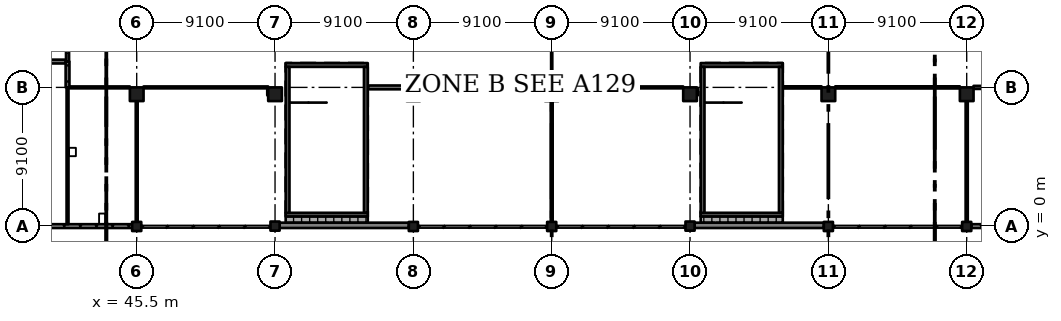
"""IFC4 building model, lengths in metres.
Left out: names, types, materials, properties, quantities, classifications, styles, units other than length and angle.
Written with IfcOpenShell. Run it as: python <this file> out.ifc"""

import sys

from ifc_helpers import new_model, si_unit, direction, frame, frame_2d, origin, origin_2d, place, context, subcontext, project, spatial, rectangle, extrude, element, fill, save


model = new_model("IFC4")
c1 = context("Model", 3, precision=1e-05, world=origin(), true_north=direction((0.0, 1.0)))
c2 = subcontext(c1, "Body", "Model", "MODEL_VIEW")
j1 = project(units=[si_unit("LENGTHUNIT", "METRE"), si_unit("PLANEANGLEUNIT", "RADIAN")], contexts=[c1])
p1 = place(None, origin())
s1 = spatial("IfcSite", under=j1, at=p1, CompositionType="ELEMENT")
p2 = place(p1, origin())
s2 = spatial("IfcBuilding", under=s1, at=p2, CompositionType="ELEMENT")
p3 = place(p2, frame((0.0, 0.0, 10.92)))
s3 = spatial("IfcBuildingStorey", under=s2, at=p3, CompositionType="ELEMENT", Elevation=10.92)
p4 = place(p3, frame((45.5, -0.05, 0.0), z_axis=(0.0, 0.0, 1.0), x_axis=(1.0, 0.0, 0.0)))
e1 = element("IfcColumn", 1, at=p4, inside=s3, PredefinedType="COLUMN", context=c2, shape_type="SweptSolid", body=[
    extrude(rectangle(XDim=0.6, YDim=0.6, at=origin_2d()), origin(), (0.0, 0.0, 1.0), 4.55),
])
p5 = place(p3, frame((45.5, 8.65, 0.0), z_axis=(0.0, 0.0, 1.0), x_axis=(1.0, 0.0, 0.0)))
e2 = element("IfcColumn", 2, at=p5, inside=s3, PredefinedType="COLUMN", context=c2, shape_type="SweptSolid", body=[
    extrude(rectangle(XDim=0.9, YDim=0.9, at=origin_2d()), origin(), (0.0, 0.0, 1.0), 4.55),
])
p6 = place(p3, frame((54.6, -0.025, 0.0), z_axis=(0.0, 0.0, 1.0), x_axis=(1.0, 0.0, 0.0)))
e3 = element("IfcColumn", 3, at=p6, inside=s3, PredefinedType="COLUMN", context=c2, shape_type="SweptSolid", body=[
    extrude(rectangle(XDim=0.6, YDim=0.6, at=origin_2d()), origin(), (0.0, 0.0, 1.0), 4.55),
])
p7 = place(p3, frame((54.6, 8.65, 0.0), z_axis=(0.0, 0.0, 1.0), x_axis=(1.0, 0.0, 0.0)))
e4 = element("IfcColumn", 4, at=p7, inside=s3, PredefinedType="COLUMN", context=c2, shape_type="SweptSolid", body=[
    extrude(rectangle(XDim=0.9, YDim=0.9, at=origin_2d()), origin(), (0.0, 0.0, 1.0), 4.55),
])
p8 = place(p3, frame((63.7, -0.05, 0.0), z_axis=(0.0, 0.0, 1.0), x_axis=(1.0, 0.0, 0.0)))
e5 = element("IfcColumn", 5, at=p8, inside=s3, PredefinedType="COLUMN", context=c2, shape_type="SweptSolid", body=[
    extrude(rectangle(XDim=0.6, YDim=0.6, at=origin_2d()), origin(), (0.0, 0.0, 1.0), 4.55),
])
p9 = place(p3, frame((63.7, 8.65, 0.0), z_axis=(0.0, 0.0, 1.0), x_axis=(1.0, 0.0, 0.0)))
e6 = element("IfcColumn", 6, at=p9, inside=s3, PredefinedType="COLUMN", context=c2, shape_type="SweptSolid", body=[
    extrude(rectangle(XDim=0.9, YDim=0.9, at=origin_2d()), origin(), (0.0, 0.0, 1.0), 4.55),
])
p10 = place(p3, frame((72.8, -0.05, 0.0), z_axis=(0.0, 0.0, 1.0), x_axis=(1.0, 0.0, 0.0)))
e7 = element("IfcColumn", 7, at=p10, inside=s3, PredefinedType="COLUMN", context=c2, shape_type="SweptSolid", body=[
    extrude(rectangle(XDim=0.6, YDim=0.6, at=origin_2d()), origin(), (0.0, 0.0, 1.0), 4.55),
])
p11 = place(p3, frame((72.8, 8.65, 0.0), z_axis=(0.0, 0.0, 1.0), x_axis=(1.0, 0.0, 0.0)))
e8 = element("IfcColumn", 8, at=p11, inside=s3, PredefinedType="COLUMN", context=c2, shape_type="SweptSolid", body=[
    extrude(rectangle(XDim=0.9, YDim=0.9, at=origin_2d()), origin(), (0.0, 0.0, 1.0), 4.55),
])
p12 = place(p3, frame((81.9, -0.025, 0.0), z_axis=(0.0, 0.0, 1.0), x_axis=(1.0, 0.0, 0.0)))
e9 = element("IfcColumn", 9, at=p12, inside=s3, PredefinedType="COLUMN", context=c2, shape_type="SweptSolid", body=[
    extrude(rectangle(XDim=0.6, YDim=0.6, at=origin_2d()), origin(), (0.0, 0.0, 1.0), 4.55),
])
p13 = place(p3, frame((81.9, 8.65, 0.0), z_axis=(0.0, 0.0, 1.0), x_axis=(1.0, 0.0, 0.0)))
e10 = element("IfcColumn", 10, at=p13, inside=s3, PredefinedType="COLUMN", context=c2, shape_type="SweptSolid", body=[
    extrude(rectangle(XDim=0.9, YDim=0.9, at=origin_2d()), origin(), (0.0, 0.0, 1.0), 4.55),
])
p14 = place(p3, frame((91.0, -0.05, 0.0), z_axis=(0.0, 0.0, 1.0), x_axis=(1.0, 0.0, 0.0)))
e11 = element("IfcColumn", 11, at=p14, inside=s3, PredefinedType="COLUMN", context=c2, shape_type="SweptSolid", body=[
    extrude(rectangle(XDim=0.6, YDim=0.6, at=origin_2d()), origin(), (0.0, 0.0, 1.0), 4.55),
])
p15 = place(p3, frame((91.0, 8.65, 0.0), z_axis=(0.0, 0.0, 1.0), x_axis=(1.0, 0.0, 0.0)))
e12 = element("IfcColumn", 12, at=p15, inside=s3, PredefinedType="COLUMN", context=c2, shape_type="SweptSolid", body=[
    extrude(rectangle(XDim=0.9, YDim=0.9, at=origin_2d()), origin(), (0.0, 0.0, 1.0), 4.55),
])
p16 = place(p3, frame((100.1, -0.05, 0.0), z_axis=(0.0, 0.0, 1.0), x_axis=(1.0, 0.0, 0.0)))
e13 = element("IfcColumn", 13, at=p16, inside=s3, PredefinedType="COLUMN", context=c2, shape_type="SweptSolid", body=[
    extrude(rectangle(XDim=0.6, YDim=0.6, at=origin_2d()), origin(), (0.0, 0.0, 1.0), 4.55),
])
p17 = place(p3, frame((100.1, 8.65, 0.0), z_axis=(0.0, 0.0, 1.0), x_axis=(1.0, 0.0, 0.0)))
e14 = element("IfcColumn", 14, at=p17, inside=s3, PredefinedType="COLUMN", context=c2, shape_type="SweptSolid", body=[
    extrude(rectangle(XDim=0.9, YDim=0.9, at=origin_2d()), origin(), (0.0, 0.0, 1.0), 4.55),
])
p18 = place(p3, frame((60.7, 0.725, 0.0), z_axis=(0.0, 0.0, 1.0), x_axis=(-1.0, 0.0, 0.0)))
e15 = element("IfcWall", 15, at=p18, inside=s3, PredefinedType="SHEAR", context=c2, shape_type="SweptSolid", body=[
    extrude(rectangle(XDim=5.4, YDim=0.25, at=frame_2d((2.7, 0.0))), origin(), (0.0, 0.0, 1.0), 4.55),
])
p19 = place(p3, frame((60.7, 10.575, 0.0), z_axis=(0.0, 0.0, 1.0), x_axis=(-1.0, 0.0, 0.0)))
e16 = element("IfcWall", 16, at=p19, inside=s3, PredefinedType="SHEAR", context=c2, shape_type="SweptSolid", body=[
    extrude(rectangle(XDim=5.4, YDim=0.25, at=frame_2d((2.7, 0.0))), origin(), (0.0, 0.0, 1.0), 4.55),
])
p20 = place(p19, frame((1.5, 0.0, 0.0)))
e17 = element("IfcOpeningElement", 17, at=p20, cuts=e16, PredefinedType="OPENING", context=c2, shape_type="SweptSolid", body=[
    extrude(rectangle(XDim=2.4, YDim=2.1, at=frame_2d((1.2, 1.05))), frame((0.0, 0.135, 0.0), z_axis=(0.0, -1.0, 0.0), x_axis=(1.0, 0.0, 0.0)), (0.0, 0.0, 1.0), 0.27),
])
for number, where, z_axis, x_axis in (
    (18, (55.425, 10.45, 0.0), (0.0, 0.0, 1.0), (0.0, -1.0, 0.0)),
    (19, (60.575, 10.45, 0.0), (0.0, 0.0, 1.0), (0.0, -1.0, 0.0)),
):
    element("IfcWall", number, at=place(p3, frame(where, z_axis=z_axis, x_axis=x_axis)), inside=s3, PredefinedType="SHEAR", context=c2, shape_type="SweptSolid", body=[
        extrude(rectangle(XDim=9.6, YDim=0.25, at=frame_2d((4.8, 0.0))), origin(), (0.0, 0.0, 1.0), 4.55),
    ])
p21 = place(p3, frame((88.0, 0.725, 0.0), z_axis=(0.0, 0.0, 1.0), x_axis=(-1.0, 0.0, 0.0)))
e20 = element("IfcWall", 20, at=p21, inside=s3, PredefinedType="SHEAR", context=c2, shape_type="SweptSolid", body=[
    extrude(rectangle(XDim=5.4, YDim=0.25, at=frame_2d((2.7, 0.0))), origin(), (0.0, 0.0, 1.0), 4.55),
])
p22 = place(p3, frame((88.0, 10.575, 0.0), z_axis=(0.0, 0.0, 1.0), x_axis=(-1.0, 0.0, 0.0)))
e21 = element("IfcWall", 21, at=p22, inside=s3, PredefinedType="SHEAR", context=c2, shape_type="SweptSolid", body=[
    extrude(rectangle(XDim=5.4, YDim=0.25, at=frame_2d((2.7, 0.0))), origin(), (0.0, 0.0, 1.0), 4.55),
])
p23 = place(p22, frame((1.5, 0.0, 0.0)))
e22 = element("IfcOpeningElement", 22, at=p23, cuts=e21, PredefinedType="OPENING", context=c2, shape_type="SweptSolid", body=[
    extrude(rectangle(XDim=2.4, YDim=2.1, at=frame_2d((1.2, 1.05))), frame((0.0, 0.135, 0.0), z_axis=(0.0, -1.0, 0.0), x_axis=(1.0, 0.0, 0.0)), (0.0, 0.0, 1.0), 0.27),
])
for number, where, z_axis, x_axis in (
    (23, (82.725, 10.45, 0.0), (0.0, 0.0, 1.0), (0.0, -1.0, 0.0)),
    (24, (87.875, 10.45, 0.0), (0.0, 0.0, 1.0), (0.0, -1.0, 0.0)),
):
    element("IfcWall", number, at=place(p3, frame(where, z_axis=z_axis, x_axis=x_axis)), inside=s3, PredefinedType="SHEAR", context=c2, shape_type="SweptSolid", body=[
        extrude(rectangle(XDim=9.6, YDim=0.25, at=frame_2d((4.8, 0.0))), origin(), (0.0, 0.0, 1.0), 4.55),
    ])
p24 = place(p3, frame((36.725, -0.025, 0.0), z_axis=(0.0, 0.0, 1.0), x_axis=(1.0, 0.0, 0.0)))
e25 = element("IfcWall", 25, at=p24, inside=s3, PredefinedType="SOLIDWALL", context=c2, shape_type="SweptSolid", body=[
    extrude(rectangle(XDim=8.475, YDim=0.25, at=frame_2d((4.237, 0.0))), origin(), (0.0, 0.0, 1.0), 3.5),
])
for number, where, z_axis, x_axis in (
    (26, (54.9, 0.025, 0.0), (0.0, 0.0, 1.0), (1.0, 0.0, 0.0)),
    (27, (82.2, 0.025, 0.0), (0.0, 0.0, 1.0), (1.0, 0.0, 0.0)),
):
    element("IfcWall", number, at=place(p3, frame(where, z_axis=z_axis, x_axis=x_axis)), inside=s3, PredefinedType="SOLIDWALL", context=c2, shape_type="SweptSolid", body=[
        extrude(rectangle(XDim=8.5, YDim=0.35, at=frame_2d((4.25, 0.0))), origin(), (0.0, 0.0, 1.0), 3.5),
    ])
p25 = place(p3, frame((100.4, -0.025, 0.0), z_axis=(0.0, 0.0, 1.0), x_axis=(1.0, 0.0, 0.0)))
e28 = element("IfcWall", 28, at=p25, inside=s3, PredefinedType="SOLIDWALL", context=c2, shape_type="SweptSolid", body=[
    extrude(rectangle(XDim=8.5, YDim=0.25, at=frame_2d((4.25, 0.0))), origin(), (0.0, 0.0, 1.0), 3.5),
])
for number, where, z_axis, x_axis in (
    (29, (55.3, 0.4, 0.0), (0.0, 0.0, 1.0), (1.0, 0.0, 0.0)),
    (30, (82.6, 0.4, 0.0), (0.0, 0.0, 1.0), (1.0, 0.0, 0.0)),
):
    element("IfcWall", number, at=place(p3, frame(where, z_axis=z_axis, x_axis=x_axis)), inside=s3, PredefinedType="SOLIDWALL", context=c2, shape_type="SweptSolid", body=[
        extrude(rectangle(XDim=5.4, YDim=0.4, at=frame_2d((2.7, 0.0))), origin(), (0.0, 0.0, 1.0), 4.25),
    ])
p26 = place(p3, frame((40.825, 10.8, 0.0), z_axis=(0.0, 0.0, 1.0), x_axis=(-1.0, 0.0, 0.0)))
e31 = element("IfcWall", 31, at=p26, inside=s3, PredefinedType="SOLIDWALL", context=c2, shape_type="SweptSolid", body=[
    extrude(rectangle(XDim=4.025, YDim=0.25, at=frame_2d((2.012, 0.0))), origin(), (0.0, 0.0, 1.0), 4.25),
])
p27 = place(p26, frame((1.15, 0.0, 0.0)))
e32 = element("IfcOpeningElement", 32, at=p27, cuts=e31, PredefinedType="OPENING", context=c2, shape_type="SweptSolid", body=[
    extrude(rectangle(XDim=1.8, YDim=2.1, at=frame_2d((0.9, 1.05))), frame((0.0, 0.135, 0.0), z_axis=(0.0, -1.0, 0.0), x_axis=(1.0, 0.0, 0.0)), (0.0, 0.0, 1.0), 0.27),
])
p28 = place(p3, frame((40.95, 0.1, 0.0), z_axis=(0.0, 0.0, 1.0), x_axis=(0.0, 1.0, 0.0)))
e33 = element("IfcWall", 33, at=p28, inside=s3, PredefinedType="PARTITIONING", context=c2, shape_type="SweptSolid", body=[
    extrude(rectangle(XDim=9.0, YDim=0.125, at=frame_2d((4.5, 0.0))), origin(), (0.0, 0.0, 1.0), 4.25),
])
p29 = place(p3, frame((40.95, 10.8, 0.0), z_axis=(0.0, 0.0, 1.0), x_axis=(0.0, -1.0, 0.0)))
e34 = element("IfcWall", 34, at=p29, inside=s3, PredefinedType="SOLIDWALL", context=c2, shape_type="SweptSolid", body=[
    extrude(rectangle(XDim=1.7, YDim=0.25, at=frame_2d((0.85, 0.0))), origin(), (0.0, 0.0, 1.0), 4.25),
])
p30 = place(p3, frame((40.95, 18.17, 0.0), z_axis=(0.0, 0.0, 1.0), x_axis=(0.0, -1.0, 0.0)))
e35 = element("IfcWall", 35, at=p30, inside=s3, PredefinedType="PARTITIONING", context=c2, shape_type="SweptSolid", body=[
    extrude(rectangle(XDim=7.37, YDim=0.2, at=frame_2d((3.685, 0.0))), origin(), (0.0, 0.0, 1.0), 4.25),
])
p31 = place(p30, frame((0.95, 0.0, 0.0)))
e36 = element("IfcOpeningElement", 36, at=p31, cuts=e35, PredefinedType="OPENING", context=c2, shape_type="SweptSolid", body=[
    extrude(rectangle(XDim=1.8, YDim=2.4, at=frame_2d((0.9, 1.2))), frame((0.0, 0.11, 0.0), z_axis=(0.0, -1.0, 0.0), x_axis=(1.0, 0.0, 0.0)), (0.0, 0.0, 1.0), 0.22),
])
p32 = place(p30, frame((4.65, 0.0, 0.0)))
e37 = element("IfcOpeningElement", 37, at=p32, cuts=e35, PredefinedType="OPENING", context=c2, shape_type="SweptSolid", body=[
    extrude(rectangle(XDim=1.8, YDim=2.4, at=frame_2d((0.9, 1.2))), frame((0.0, 0.11, 0.0), z_axis=(0.0, -1.0, 0.0), x_axis=(1.0, 0.0, 0.0)), (0.0, 0.0, 1.0), 0.22),
])
p33 = place(p3, frame((45.05, 9.1, 0.0), z_axis=(0.0, 0.0, 1.0), x_axis=(-1.0, 0.0, 0.0)))
e38 = element("IfcWall", 38, at=p33, inside=s3, PredefinedType="PARTITIONING", context=c2, shape_type="SweptSolid", body=[
    extrude(rectangle(XDim=3.975, YDim=0.125, at=frame_2d((1.988, 0.0))), origin(), (0.0, 0.0, 1.0), 3.55),
])
p34 = place(p33, frame((1.45, 0.0, 0.0)))
e39 = element("IfcOpeningElement", 39, at=p34, cuts=e38, PredefinedType="OPENING", context=c2, shape_type="SweptSolid", body=[
    extrude(rectangle(XDim=1.0, YDim=2.1, at=frame_2d((0.5, 1.05))), frame((0.0, 0.073, 0.0), z_axis=(0.0, -1.0, 0.0), x_axis=(1.0, 0.0, 0.0)), (0.0, 0.0, 1.0), 0.145),
])
p35 = place(p3, frame((45.5, 8.2, 0.0), z_axis=(0.0, 0.0, 1.0), x_axis=(0.0, -1.0, 0.0)))
e40 = element("IfcWall", 40, at=p35, inside=s3, PredefinedType="PARTITIONING", context=c2, shape_type="SweptSolid", body=[
    extrude(rectangle(XDim=7.95, YDim=0.125, at=frame_2d((3.975, 0.0))), origin(), (0.0, 0.0, 1.0), 3.55),
])
p36 = place(p3, frame((54.15, 8.575, 0.0), z_axis=(0.0, 0.0, 1.0), x_axis=(0.0, 1.0, 0.0)))
e41 = element("IfcWall", 41, at=p36, inside=s3, PredefinedType="PARTITIONING", context=c2, shape_type="SweptSolid", body=[
    extrude(rectangle(XDim=0.45, YDim=0.125, at=frame_2d((0.225, 0.0))), origin(), (0.0, 0.0, 1.0), 4.25),
])
p37 = place(p3, frame((54.15, 9.1, 0.0), z_axis=(0.0, 0.0, 1.0), x_axis=(-1.0, 0.0, 0.0)))
e42 = element("IfcWall", 42, at=p37, inside=s3, PredefinedType="PARTITIONING", context=c2, shape_type="SweptSolid", body=[
    extrude(rectangle(XDim=8.2, YDim=0.125, at=frame_2d((4.1, 0.0))), origin(), (0.0, 0.0, 1.0), 3.55),
])
p38 = place(p37, frame((3.65, 0.0, 0.0)))
e43 = element("IfcOpeningElement", 43, at=p38, cuts=e42, PredefinedType="OPENING", context=c2, shape_type="SweptSolid", body=[
    extrude(rectangle(XDim=0.9, YDim=2.1, at=frame_2d((0.45, 1.05))), frame((0.0, 0.073, 0.0), z_axis=(0.0, -1.0, 0.0), x_axis=(1.0, 0.0, 0.0)), (0.0, 0.0, 1.0), 0.145),
])
p39 = place(p3, frame((63.25, 8.55, 0.0), z_axis=(0.0, 0.0, 1.0), x_axis=(0.0, 1.0, 0.0)))
e44 = element("IfcWall", 44, at=p39, inside=s3, PredefinedType="SOLIDWALL", context=c2, shape_type="SweptSolid", body=[
    extrude(rectangle(XDim=0.45, YDim=0.25, at=frame_2d((0.225, 0.0))), origin(), (0.0, 0.0, 1.0), 4.25),
])
p40 = place(p3, frame((63.25, 9.1, 0.0), z_axis=(0.0, 0.0, 1.0), x_axis=(-1.0, 0.0, 0.0)))
e45 = element("IfcWall", 45, at=p40, inside=s3, PredefinedType="SOLIDWALL", context=c2, shape_type="SweptSolid", body=[
    extrude(rectangle(XDim=2.52, YDim=0.25, at=frame_2d((1.26, 0.0))), origin(), (0.0, 0.0, 1.0), 3.55),
])
p41 = place(p3, frame((72.35, 9.1, 0.0), z_axis=(0.0, 0.0, 1.0), x_axis=(-1.0, 0.0, 0.0)))
e46 = element("IfcWall", 46, at=p41, inside=s3, PredefinedType="SOLIDWALL", context=c2, shape_type="SweptSolid", body=[
    extrude(rectangle(XDim=8.2, YDim=0.25, at=frame_2d((4.1, 0.0))), origin(), (0.0, 0.0, 1.0), 3.55),
])
p42 = place(p41, frame((3.15, 0.0, 0.0)))
e47 = element("IfcOpeningElement", 47, at=p42, cuts=e46, PredefinedType="OPENING", context=c2, shape_type="SweptSolid", body=[
    extrude(rectangle(XDim=1.8, YDim=2.1, at=frame_2d((0.9, 1.05))), frame((0.0, 0.135, 0.0), z_axis=(0.0, -1.0, 0.0), x_axis=(1.0, 0.0, 0.0)), (0.0, 0.0, 1.0), 0.27),
])
p43 = place(p3, frame((72.8, 8.2, 0.0), z_axis=(0.0, 0.0, 1.0), x_axis=(0.0, -1.0, 0.0)))
e48 = element("IfcWall", 48, at=p43, inside=s3, PredefinedType="PARTITIONING", context=c2, shape_type="SweptSolid", body=[
    extrude(rectangle(XDim=7.95, YDim=0.125, at=frame_2d((3.975, 0.0))), origin(), (0.0, 0.0, 1.0), 3.55),
])
p44 = place(p3, frame((81.45, 9.1, 0.0), z_axis=(0.0, 0.0, 1.0), x_axis=(-1.0, 0.0, 0.0)))
e49 = element("IfcWall", 49, at=p44, inside=s3, PredefinedType="PARTITIONING", context=c2, shape_type="SweptSolid", body=[
    extrude(rectangle(XDim=8.2, YDim=0.125, at=frame_2d((4.1, 0.0))), origin(), (0.0, 0.0, 1.0), 3.55),
])
p45 = place(p44, frame((3.65, 0.0, 0.0)))
e50 = element("IfcOpeningElement", 50, at=p45, cuts=e49, PredefinedType="OPENING", context=c2, shape_type="SweptSolid", body=[
    extrude(rectangle(XDim=0.9, YDim=2.1, at=frame_2d((0.45, 1.05))), frame((0.0, 0.073, 0.0), z_axis=(0.0, -1.0, 0.0), x_axis=(1.0, 0.0, 0.0)), (0.0, 0.0, 1.0), 0.145),
])
p46 = place(p3, frame((82.35, 9.025, 0.0), z_axis=(0.0, 0.0, 1.0), x_axis=(0.0, -1.0, 0.0)))
e51 = element("IfcWall", 51, at=p46, inside=s3, PredefinedType="PARTITIONING", context=c2, shape_type="SweptSolid", body=[
    extrude(rectangle(XDim=0.45, YDim=0.125, at=frame_2d((0.225, 0.0))), origin(), (0.0, 0.0, 1.0), 4.25),
])
p47 = place(p3, frame((90.55, 9.1, 0.0), z_axis=(0.0, 0.0, 1.0), x_axis=(-1.0, 0.0, 0.0)))
e52 = element("IfcWall", 52, at=p47, inside=s3, PredefinedType="SOLIDWALL", context=c2, shape_type="SweptSolid", body=[
    extrude(rectangle(XDim=2.52, YDim=0.14, at=frame_2d((1.26, 0.0))), origin(), (0.0, 0.0, 1.0), 3.55),
])
p48 = place(p3, frame((99.65, 9.1, 0.0), z_axis=(0.0, 0.0, 1.0), x_axis=(-1.0, 0.0, 0.0)))
e53 = element("IfcWall", 53, at=p48, inside=s3, PredefinedType="SOLIDWALL", context=c2, shape_type="SweptSolid", body=[
    extrude(rectangle(XDim=8.2, YDim=0.14, at=frame_2d((4.1, 0.0))), origin(), (0.0, 0.0, 1.0), 3.55),
])
p49 = place(p48, frame((3.35, 0.0, 0.0)))
e54 = element("IfcOpeningElement", 54, at=p49, cuts=e53, PredefinedType="OPENING", context=c2, shape_type="SweptSolid", body=[
    extrude(rectangle(XDim=1.5, YDim=2.1, at=frame_2d((0.75, 1.05))), frame((0.0, 0.08, 0.0), z_axis=(0.0, -1.0, 0.0), x_axis=(1.0, 0.0, 0.0)), (0.0, 0.0, 1.0), 0.16),
])
p50 = place(p3, frame((100.1, 8.2, 0.0), z_axis=(0.0, 0.0, 1.0), x_axis=(0.0, -1.0, 0.0)))
e55 = element("IfcWall", 55, at=p50, inside=s3, PredefinedType="SOLIDWALL", context=c2, shape_type="SweptSolid", body=[
    extrude(rectangle(XDim=7.95, YDim=0.14, at=frame_2d((3.975, 0.0))), origin(), (0.0, 0.0, 1.0), 3.55),
])
p51 = place(p3, frame((104.525, 9.1, 0.0), z_axis=(0.0, 0.0, 1.0), x_axis=(-1.0, 0.0, 0.0)))
e56 = element("IfcWall", 56, at=p51, inside=s3, PredefinedType="PARTITIONING", context=c2, shape_type="SweptSolid", body=[
    extrude(rectangle(XDim=3.975, YDim=0.2, at=frame_2d((1.987, 0.0))), origin(), (0.0, 0.0, 1.0), 3.55),
])
p52 = place(p51, frame((1.45, 0.0, 0.0)))
e57 = element("IfcOpeningElement", 57, at=p52, cuts=e56, PredefinedType="OPENING", context=c2, shape_type="SweptSolid", body=[
    extrude(rectangle(XDim=1.0, YDim=2.1, at=frame_2d((0.5, 1.05))), frame((0.0, 0.11, 0.0), z_axis=(0.0, -1.0, 0.0), x_axis=(1.0, 0.0, 0.0)), (0.0, 0.0, 1.0), 0.22),
])
p53 = place(p34, origin())
e58 = element("IfcDoor", 58, at=p53, inside=s3, OperationType="SINGLE_SWING_RIGHT", PredefinedType="DOOR", context=c2, shape_type="SweptSolid", body=[
    extrude(rectangle(XDim=1.0, YDim=2.1, at=frame_2d((0.5, 1.05))), frame((0.0, 0.025, 0.0), z_axis=(0.0, -1.0, 0.0), x_axis=(1.0, 0.0, 0.0)), (0.0, 0.0, 1.0), 0.05),
])
fill(e39, e58)
p54 = place(p38, origin())
e59 = element("IfcDoor", 59, at=p54, inside=s3, OperationType="SINGLE_SWING_LEFT", PredefinedType="DOOR", context=c2, shape_type="SweptSolid", body=[
    extrude(rectangle(XDim=0.9, YDim=2.1, at=frame_2d((0.45, 1.05))), frame((0.0, 0.025, 0.0), z_axis=(0.0, -1.0, 0.0), x_axis=(1.0, 0.0, 0.0)), (0.0, 0.0, 1.0), 0.05),
])
fill(e43, e59)
p55 = place(p42, origin())
e60 = element("IfcDoor", 60, at=p55, inside=s3, OperationType="DOUBLE_DOOR_SINGLE_SWING", PredefinedType="DOOR", context=c2, shape_type="SweptSolid", body=[
    extrude(rectangle(XDim=1.8, YDim=2.1, at=frame_2d((0.9, 1.05))), frame((0.0, 0.025, 0.0), z_axis=(0.0, -1.0, 0.0), x_axis=(1.0, 0.0, 0.0)), (0.0, 0.0, 1.0), 0.05),
])
fill(e47, e60)
p56 = place(p45, origin())
e61 = element("IfcDoor", 61, at=p56, inside=s3, OperationType="SINGLE_SWING_RIGHT", PredefinedType="DOOR", context=c2, shape_type="SweptSolid", body=[
    extrude(rectangle(XDim=0.9, YDim=2.1, at=frame_2d((0.45, 1.05))), frame((0.0, 0.025, 0.0), z_axis=(0.0, -1.0, 0.0), x_axis=(1.0, 0.0, 0.0)), (0.0, 0.0, 1.0), 0.05),
])
fill(e50, e61)
p57 = place(p49, origin())
e62 = element("IfcDoor", 62, at=p57, inside=s3, OperationType="DOUBLE_DOOR_SINGLE_SWING", PredefinedType="DOOR", context=c2, shape_type="SweptSolid", body=[
    extrude(rectangle(XDim=1.5, YDim=2.1, at=frame_2d((0.75, 1.05))), frame((0.0, 0.025, 0.0), z_axis=(0.0, -1.0, 0.0), x_axis=(1.0, 0.0, 0.0)), (0.0, 0.0, 1.0), 0.05),
])
fill(e54, e62)
p58 = place(p20, origin())
e63 = element("IfcDoor", 63, at=p58, inside=s3, OperationType="DOUBLE_DOOR_SINGLE_SWING", PredefinedType="DOOR", context=c2, shape_type="SweptSolid", body=[
    extrude(rectangle(XDim=2.4, YDim=2.1, at=frame_2d((1.2, 1.05))), frame((0.0, 0.025, 0.0), z_axis=(0.0, -1.0, 0.0), x_axis=(1.0, 0.0, 0.0)), (0.0, 0.0, 1.0), 0.05),
])
fill(e17, e63)
p59 = place(p23, origin())
e64 = element("IfcDoor", 64, at=p59, inside=s3, OperationType="DOUBLE_DOOR_SINGLE_SWING", PredefinedType="DOOR", context=c2, shape_type="SweptSolid", body=[
    extrude(rectangle(XDim=2.4, YDim=2.1, at=frame_2d((1.2, 1.05))), frame((0.0, 0.025, 0.0), z_axis=(0.0, -1.0, 0.0), x_axis=(1.0, 0.0, 0.0)), (0.0, 0.0, 1.0), 0.05),
])
fill(e22, e64)
save(model, sys.argv[1])
